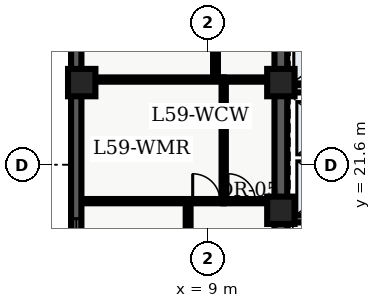
"""IFC4 building model, lengths in metres.
Left out: names, types, materials, properties, quantities, classifications, styles, units other than length and angle.
Written with IfcOpenShell. Run it as: python <this file> out.ifc"""

import sys

from ifc_helpers import new_model, entity, si_unit, converted_unit, direction, frame, origin_with_axes, origin_2d_with_axis, place, context, subcontext, project, spatial, polyline, rectangle, outline, extrude, element, fill, save


model = new_model("IFC4")
c1 = context("Model", 3, precision=1e-05, world=origin_with_axes(), true_north=direction((0.0, 1.0)))
c2 = subcontext(c1, "Body", "Model", "MODEL_VIEW")
j1 = project(units=[si_unit("LENGTHUNIT", "METRE"), converted_unit("PLANEANGLEUNIT", "DEGREE", entity("IfcPlaneAngleMeasure", 0.017), si_unit("PLANEANGLEUNIT", "RADIAN"), dimensions=[0, 0, 0, 0, 0, 0, 0])], contexts=[c1])
p1 = place(None, origin_with_axes())
s1 = spatial("IfcSite", under=j1, at=p1, CompositionType="ELEMENT")
p2 = place(p1, origin_with_axes())
s2 = spatial("IfcBuilding", under=s1, at=p2, CompositionType="ELEMENT")
p3 = place(p2, frame((0.0, 0.0, 240.3), z_axis=(0.0, 0.0, 1.0), x_axis=(1.0, 0.0, 0.0)))
s3 = spatial("IfcBuildingStorey", under=s2, at=p3, CompositionType="ELEMENT", Elevation=240.3)
p4 = place(p3, frame((11.4, 10.8, 0.0), z_axis=(0.0, 0.0, 1.0), x_axis=(0.0, 1.0, 0.0)))
e1 = element("IfcWall", 1, at=p4, inside=s3, PredefinedType="SHEAR", context=c2, shape_type="SweptSolid", body=[
    extrude(outline(polyline([(0.0, -0.21), (27.0, -0.21), (27.0, 0.21), (0.0, 0.21), (0.0, -0.21)])), origin_with_axes(), (0.0, 0.0, 1.0), 3.66),
])
p5 = place(p3, frame((11.61, 19.825, 0.0), z_axis=(0.0, 0.0, 1.0), x_axis=(1.0, 0.0, 0.0)))
e2 = element("IfcWall", 2, at=p5, inside=s3, PredefinedType="SHEAR", context=c2, shape_type="SweptSolid", body=[
    extrude(outline(polyline([(0.0, -0.125), (6.78, -0.125), (6.78, 0.125), (0.0, 0.125), (0.0, -0.125)])), origin_with_axes(), (0.0, 0.0, 1.0), 3.66),
])
p6 = place(p3, frame((11.7, 24.1, 0.0), z_axis=(0.0, 0.0, 1.0), x_axis=(1.0, 0.0, 0.0)))
e3 = element("IfcWall", 3, at=p6, inside=s3, PredefinedType="SOLIDWALL", context=c2, shape_type="SweptSolid", body=[
    extrude(outline(polyline([(0.0, -0.125), (6.6, -0.125), (6.6, 0.125), (0.0, 0.125), (0.0, -0.125)])), origin_with_axes(), (0.0, 0.0, 1.0), 2.7),
])
p7 = place(p6, frame((3.6, 0.0, 0.0), z_axis=(0.0, 0.0, 1.0), x_axis=(1.0, 0.0, 0.0)))
e4 = element("IfcOpeningElement", 4, at=p7, cuts=e3, PredefinedType="OPENING", context=c2, shape_type="SweptSolid", body=[
    extrude(rectangle(XDim=0.9, YDim=0.27, at=origin_2d_with_axis()), origin_with_axes(), (0.0, 0.0, 1.0), 2.15),
])
p8 = place(p6, frame((5.65, 0.0, 0.0), z_axis=(0.0, 0.0, 1.0), x_axis=(1.0, 0.0, 0.0)))
e5 = element("IfcOpeningElement", 5, at=p8, cuts=e3, PredefinedType="OPENING", context=c2, shape_type="SweptSolid", body=[
    extrude(rectangle(XDim=0.9, YDim=0.27, at=origin_2d_with_axis()), origin_with_axes(), (0.0, 0.0, 1.0), 2.15),
])
for number, where, z_axis, x_axis in (
    (6, (11.4, 20.1, 0.0), (0.0, 0.0, 1.0), (1.0, 0.0, 0.0)),
    (7, (11.4, 24.3, 0.0), (0.0, 0.0, 1.0), (1.0, 0.0, 0.0)),
    (8, (4.85, 24.3, 0.0), (0.0, 0.0, 1.0), (1.0, 0.0, 0.0)),
):
    element("IfcColumn", number, at=place(p3, frame(where, z_axis=z_axis, x_axis=x_axis)), inside=s3, PredefinedType="COLUMN", context=c2, shape_type="SweptSolid", body=[
        extrude(rectangle(XDim=0.9, YDim=0.9, at=origin_2d_with_axis()), origin_with_axes(), (0.0, 0.0, 1.0), 3.9),
    ])
p9 = place(p3, frame((9.52, 20.4, 0.0), z_axis=(0.0, 0.0, 1.0), x_axis=(0.0, 1.0, 0.0)))
e9 = element("IfcWall", 9, at=p9, inside=s3, PredefinedType="PARTITIONING", context=c2, shape_type="SweptSolid", body=[
    extrude(outline(polyline([(0.0, -0.07), (4.0, -0.07), (4.0, 0.07), (0.0, 0.07), (0.0, -0.07)])), origin_with_axes(), (0.0, 0.0, 1.0), 2.7),
])
p10 = place(p3, frame((9.52, 20.4, 0.0), z_axis=(0.0, 0.0, 1.0), x_axis=(1.0, 0.0, 0.0)))
e10 = element("IfcWall", 10, at=p10, inside=s3, PredefinedType="PARTITIONING", context=c2, shape_type="SweptSolid", body=[
    extrude(outline(polyline([(0.0, -0.07), (1.58, -0.07), (1.58, 0.07), (0.0, 0.07), (0.0, -0.07)])), origin_with_axes(), (0.0, 0.0, 1.0), 2.7),
])
p11 = place(p10, frame((0.59, 0.0, 0.0), z_axis=(0.0, 0.0, 1.0), x_axis=(1.0, 0.0, 0.0)))
e11 = element("IfcOpeningElement", 11, at=p11, cuts=e10, PredefinedType="OPENING", context=c2, shape_type="SweptSolid", body=[
    extrude(rectangle(XDim=0.9, YDim=0.16, at=origin_2d_with_axis()), origin_with_axes(), (0.0, 0.0, 1.0), 2.15),
])
p12 = place(p3, frame((9.52, 24.4, 0.0), z_axis=(0.0, 0.0, 1.0), x_axis=(1.0, 0.0, 0.0)))
e12 = element("IfcWall", 12, at=p12, inside=s3, PredefinedType="PARTITIONING", context=c2, shape_type="SweptSolid", body=[
    extrude(outline(polyline([(0.0, -0.07), (1.58, -0.07), (1.58, 0.07), (0.0, 0.07), (0.0, -0.07)])), origin_with_axes(), (0.0, 0.0, 1.0), 2.7),
])
p13 = place(p3, frame((8.35, 7.8, 0.0), z_axis=(0.0, 0.0, 1.0), x_axis=(0.0, 1.0, 0.0)))
e13 = element("IfcWall", 13, at=p13, inside=s3, PredefinedType="PARTITIONING", context=c2, shape_type="SweptSolid", body=[
    extrude(outline(polyline([(0.0, -0.08), (12.6, -0.08), (12.6, 0.08), (0.0, 0.08), (0.0, -0.08)])), origin_with_axes(), (0.0, 0.0, 1.0), 2.7),
])
p14 = place(p13, frame((2.932, 0.0, 0.0), z_axis=(0.0, 0.0, 1.0), x_axis=(1.0, 0.0, 0.0)))
e14 = element("IfcOpeningElement", 14, at=p14, cuts=e13, PredefinedType="OPENING", context=c2, shape_type="SweptSolid", body=[
    extrude(rectangle(XDim=1.0, YDim=0.18, at=origin_2d_with_axis()), origin_with_axes(), (0.0, 0.0, 1.0), 2.15),
])
p15 = place(p13, frame((9.127, 0.0, 0.0), z_axis=(0.0, 0.0, 1.0), x_axis=(1.0, 0.0, 0.0)))
e15 = element("IfcOpeningElement", 15, at=p15, cuts=e13, PredefinedType="OPENING", context=c2, shape_type="SweptSolid", body=[
    extrude(rectangle(XDim=1.0, YDim=0.18, at=origin_2d_with_axis()), origin_with_axes(), (0.0, 0.0, 1.0), 2.15),
])
p16 = place(p3, frame((9.25, 24.4, 0.0), z_axis=(0.0, 0.0, 1.0), x_axis=(0.0, 1.0, 0.0)))
e16 = element("IfcWall", 16, at=p16, inside=s3, PredefinedType="PARTITIONING", context=c2, shape_type="SweptSolid", body=[
    extrude(outline(polyline([(0.0, -0.08), (16.1, -0.08), (16.1, 0.08), (0.0, 0.08), (0.0, -0.08)])), origin_with_axes(), (0.0, 0.0, 1.0), 2.7),
])
p17 = place(p16, frame((3.775, 0.0, 0.0), z_axis=(0.0, 0.0, 1.0), x_axis=(1.0, 0.0, 0.0)))
e17 = element("IfcOpeningElement", 17, at=p17, cuts=e16, PredefinedType="OPENING", context=c2, shape_type="SweptSolid", body=[
    extrude(rectangle(XDim=1.0, YDim=0.18, at=origin_2d_with_axis()), origin_with_axes(), (0.0, 0.0, 1.0), 2.15),
])
p18 = place(p16, frame((9.412, 0.0, 0.0), z_axis=(0.0, 0.0, 1.0), x_axis=(1.0, 0.0, 0.0)))
e18 = element("IfcOpeningElement", 18, at=p18, cuts=e16, PredefinedType="OPENING", context=c2, shape_type="SweptSolid", body=[
    extrude(rectangle(XDim=1.0, YDim=0.18, at=origin_2d_with_axis()), origin_with_axes(), (0.0, 0.0, 1.0), 2.15),
])
p19 = place(p16, frame((13.662, 0.0, 0.0), z_axis=(0.0, 0.0, 1.0), x_axis=(1.0, 0.0, 0.0)))
e19 = element("IfcOpeningElement", 19, at=p19, cuts=e16, PredefinedType="OPENING", context=c2, shape_type="SweptSolid", body=[
    extrude(rectangle(XDim=1.0, YDim=0.18, at=origin_2d_with_axis()), origin_with_axes(), (0.0, 0.0, 1.0), 2.15),
])
p20 = place(p3, frame((4.835, 20.4, 0.0), z_axis=(0.0, 0.0, 1.0), x_axis=(1.0, 0.0, 0.0)))
e20 = element("IfcWall", 20, at=p20, inside=s3, PredefinedType="PARTITIONING", context=c2, shape_type="SweptSolid", body=[
    extrude(outline(polyline([(0.0, -0.07), (4.685, -0.07), (4.685, 0.07), (0.0, 0.07), (0.0, -0.07)])), origin_with_axes(), (0.0, 0.0, 1.0), 2.7),
])
p21 = place(p20, frame((4.115, 0.0, 0.0), z_axis=(0.0, 0.0, 1.0), x_axis=(1.0, 0.0, 0.0)))
e21 = element("IfcOpeningElement", 21, at=p21, cuts=e20, PredefinedType="OPENING", context=c2, shape_type="SweptSolid", body=[
    extrude(rectangle(XDim=0.9, YDim=0.16, at=origin_2d_with_axis()), origin_with_axes(), (0.0, 0.0, 1.0), 2.15),
])
p22 = place(p3, frame((4.835, 24.4, 0.0), z_axis=(0.0, 0.0, 1.0), x_axis=(1.0, 0.0, 0.0)))
e22 = element("IfcWall", 22, at=p22, inside=s3, PredefinedType="PARTITIONING", context=c2, shape_type="SweptSolid", body=[
    extrude(outline(polyline([(0.0, -0.07), (4.685, -0.07), (4.685, 0.07), (0.0, 0.07), (0.0, -0.07)])), origin_with_axes(), (0.0, 0.0, 1.0), 2.7),
])
p23 = place(p3, frame((4.67, 2.74, 0.0), z_axis=(0.0, 0.0, 1.0), x_axis=(0.0, 1.0, 0.0)))
e23 = element("IfcWall", 23, at=p23, inside=s3, PredefinedType="SOLIDWALL", context=c2, shape_type="SweptSolid", body=[
    extrude(outline(polyline([(0.0, -0.17), (43.46, -0.17), (43.46, 0.17), (0.0, 0.17), (0.0, -0.17)])), origin_with_axes(), (0.0, 0.0, 1.0), 3.66),
])
p24 = place(p23, frame((2.948, 0.0, 0.45), z_axis=(0.0, 0.0, 1.0), x_axis=(1.0, 0.0, 0.0)))
e24 = element("IfcOpeningElement", 24, at=p24, cuts=e23, PredefinedType="OPENING", context=c2, shape_type="SweptSolid", body=[
    extrude(rectangle(XDim=1.8, YDim=0.36, at=origin_2d_with_axis()), origin_with_axes(), (0.0, 0.0, 1.0), 2.1),
])
p25 = place(p23, frame((12.339, 0.0, 0.45), z_axis=(0.0, 0.0, 1.0), x_axis=(1.0, 0.0, 0.0)))
e25 = element("IfcOpeningElement", 25, at=p25, cuts=e23, PredefinedType="OPENING", context=c2, shape_type="SweptSolid", body=[
    extrude(rectangle(XDim=1.8, YDim=0.36, at=origin_2d_with_axis()), origin_with_axes(), (0.0, 0.0, 1.0), 2.1),
])
p26 = place(p23, frame((16.184, 0.0, 0.45), z_axis=(0.0, 0.0, 1.0), x_axis=(1.0, 0.0, 0.0)))
e26 = element("IfcOpeningElement", 26, at=p26, cuts=e23, PredefinedType="OPENING", context=c2, shape_type="SweptSolid", body=[
    extrude(rectangle(XDim=1.8, YDim=0.36, at=origin_2d_with_axis()), origin_with_axes(), (0.0, 0.0, 1.0), 2.1),
])
p27 = place(p23, frame((26.426, 0.0, 0.45), z_axis=(0.0, 0.0, 1.0), x_axis=(1.0, 0.0, 0.0)))
e27 = element("IfcOpeningElement", 27, at=p27, cuts=e23, PredefinedType="OPENING", context=c2, shape_type="SweptSolid", body=[
    extrude(rectangle(XDim=1.8, YDim=0.36, at=origin_2d_with_axis()), origin_with_axes(), (0.0, 0.0, 1.0), 2.1),
])
p28 = place(p23, frame((31.121, 0.0, 0.45), z_axis=(0.0, 0.0, 1.0), x_axis=(1.0, 0.0, 0.0)))
e28 = element("IfcOpeningElement", 28, at=p28, cuts=e23, PredefinedType="OPENING", context=c2, shape_type="SweptSolid", body=[
    extrude(rectangle(XDim=1.8, YDim=0.36, at=origin_2d_with_axis()), origin_with_axes(), (0.0, 0.0, 1.0), 2.1),
])
p29 = place(p23, frame((40.062, 0.0, 0.45), z_axis=(0.0, 0.0, 1.0), x_axis=(1.0, 0.0, 0.0)))
e29 = element("IfcOpeningElement", 29, at=p29, cuts=e23, PredefinedType="OPENING", context=c2, shape_type="SweptSolid", body=[
    extrude(rectangle(XDim=1.8, YDim=0.36, at=origin_2d_with_axis()), origin_with_axes(), (0.0, 0.0, 1.0), 2.1),
])
p30 = place(p10, frame((0.59, 0.0, 0.0), z_axis=(0.0, 0.0, 1.0), x_axis=(1.0, 0.0, 0.0)))
e30 = element("IfcDoor", 30, at=p30, inside=s3, OperationType="SINGLE_SWING_LEFT", PredefinedType="DOOR", context=c2, shape_type="SweptSolid", body=[
    extrude(rectangle(XDim=0.9, YDim=0.084, at=origin_2d_with_axis()), origin_with_axes(), (0.0, 0.0, 1.0), 2.15),
])
fill(e11, e30)
p31 = place(p20, frame((4.115, 0.0, 0.0), z_axis=(0.0, 0.0, 1.0), x_axis=(1.0, 0.0, 0.0)))
e31 = element("IfcDoor", 31, at=p31, inside=s3, OperationType="SINGLE_SWING_LEFT", PredefinedType="DOOR", context=c2, shape_type="SweptSolid", body=[
    extrude(rectangle(XDim=0.9, YDim=0.084, at=origin_2d_with_axis()), origin_with_axes(), (0.0, 0.0, 1.0), 2.15),
])
fill(e21, e31)
p32 = place(p23, frame((16.184, 0.0, 0.45), z_axis=(0.0, 0.0, 1.0), x_axis=(1.0, 0.0, 0.0)))
e32 = element("IfcWindow", 32, at=p32, inside=s3, PredefinedType="WINDOW", context=c2, shape_type="SweptSolid", body=[
    extrude(rectangle(XDim=1.8, YDim=0.09, at=origin_2d_with_axis()), origin_with_axes(), (0.0, 0.0, 1.0), 2.1),
])
fill(e26, e32)
save(model, sys.argv[1])
